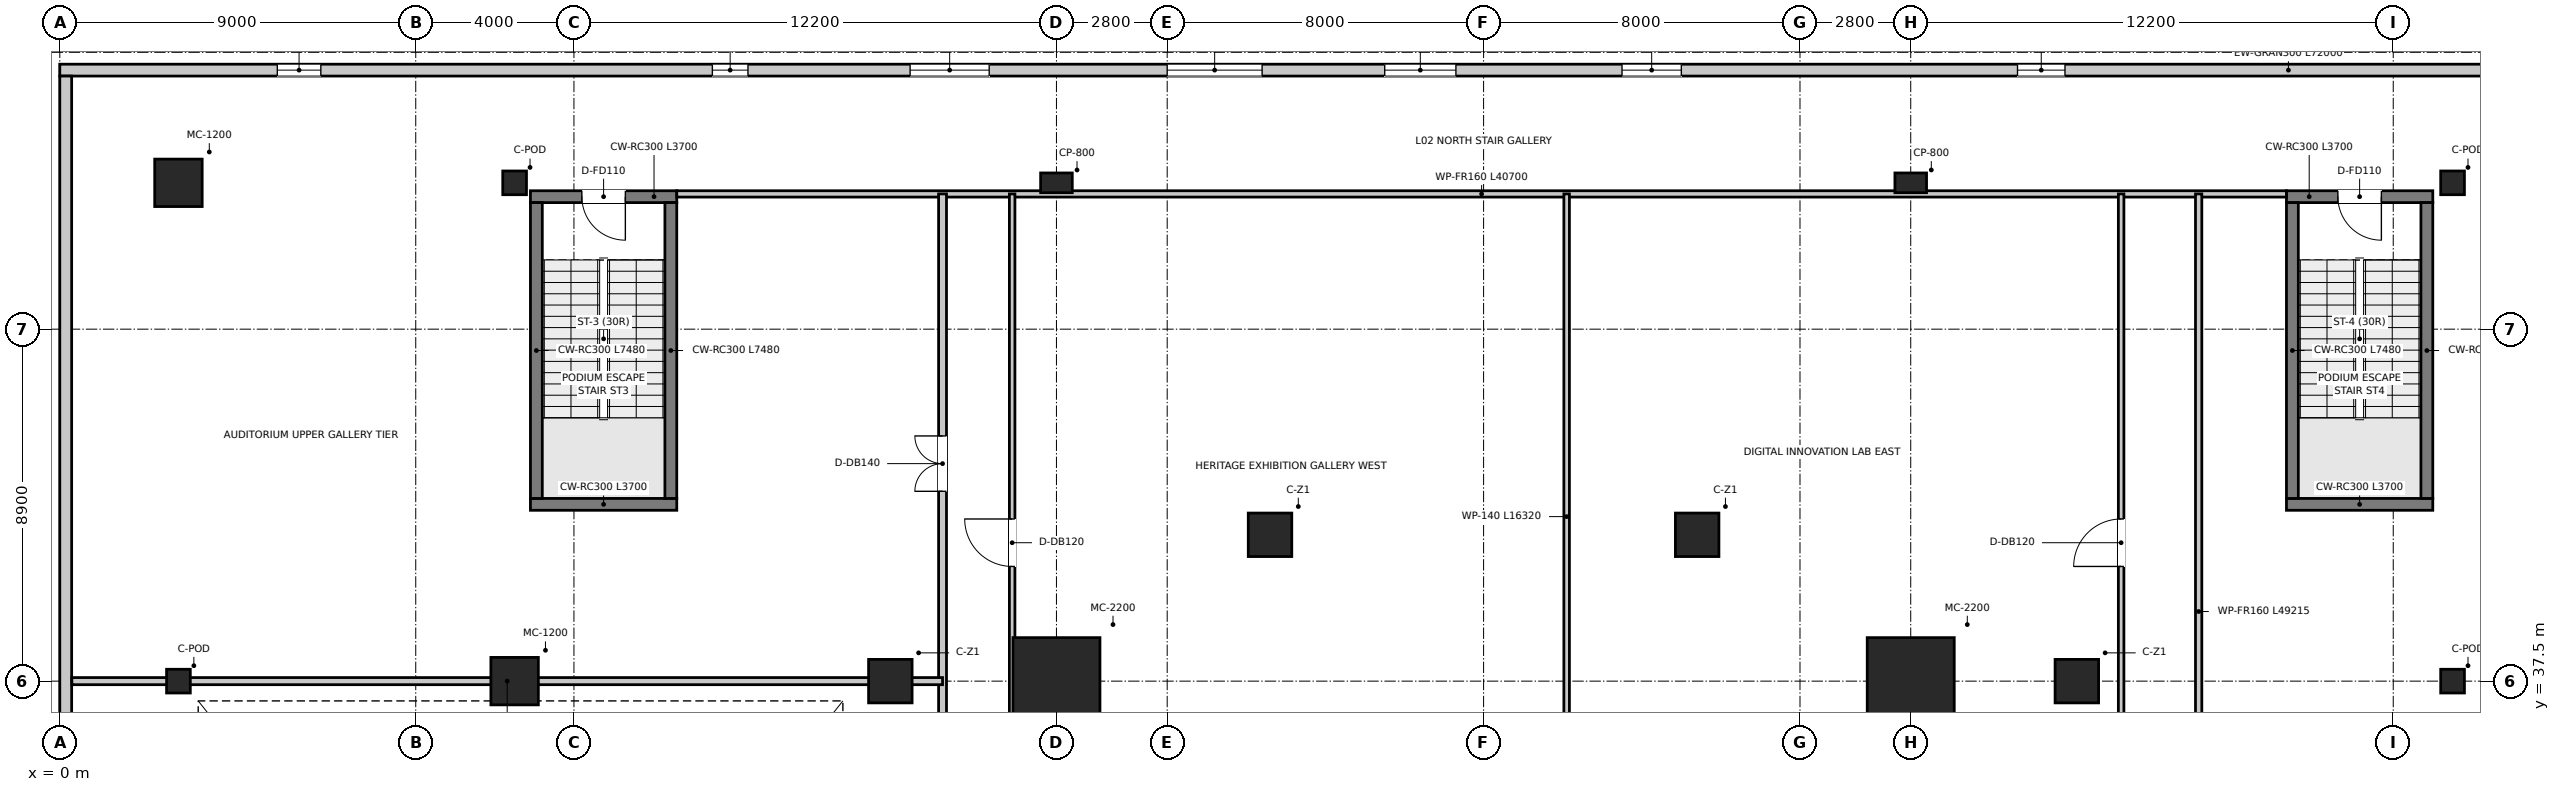
"""IFC4 building model, lengths in metres.
Left out: names, types, materials, properties, quantities, classifications, styles, units other than length and angle.
Written with IfcOpenShell. Run it as: python <this file> out.ifc"""

import sys

from ifc_helpers import new_model, si_unit, direction, frame, frame_2d, origin, origin_2d, place, context, subcontext, project, spatial, rectangle, extrude, source, transform, mapped, element, fill, save


model = new_model("IFC4")
c1 = context("Model", 3, precision=1e-05, world=origin(), true_north=direction((0.0, 1.0)))
c2 = subcontext(c1, "Body", "Model", "MODEL_VIEW")
j1 = project(units=[si_unit("LENGTHUNIT", "METRE"), si_unit("PLANEANGLEUNIT", "RADIAN")], contexts=[c1])
p1 = place(None, origin())
s1 = spatial("IfcSite", under=j1, at=p1, CompositionType="ELEMENT")
p2 = place(p1, origin())
s2 = spatial("IfcBuilding", under=s1, at=p2, CompositionType="ELEMENT")
p3 = place(p2, frame((0.0, 0.0, 10.4)))
s3 = spatial("IfcBuildingStorey", under=s2, at=p3, CompositionType="ELEMENT", Elevation=10.4)
p4 = place(p3, frame((11.9, 41.97, 0.0), z_axis=(0.0, 0.0, 1.0), x_axis=(1.0, 0.0, 0.0)))
e1 = element("IfcWall", 1, at=p4, inside=s3, PredefinedType="SHEAR", context=c2, shape_type="SweptSolid", body=[
    extrude(rectangle(XDim=3.7, YDim=0.3, at=frame_2d((1.85, 0.0))), origin(), (0.0, 0.0, 1.0), 5.0),
])
p5 = place(p3, frame((15.6, 49.75, 0.0), z_axis=(0.0, 0.0, 1.0), x_axis=(-1.0, 0.0, 0.0)))
e2 = element("IfcWall", 2, at=p5, inside=s3, PredefinedType="SHEAR", context=c2, shape_type="SweptSolid", body=[
    extrude(rectangle(XDim=3.7, YDim=0.3, at=frame_2d((1.85, 0.0))), origin(), (0.0, 0.0, 1.0), 5.0),
])
p6 = place(p5, frame((1.3, 0.0, 0.0)))
e3 = element("IfcOpeningElement", 3, at=p6, cuts=e2, PredefinedType="OPENING", context=c2, shape_type="SweptSolid", body=[
    extrude(rectangle(XDim=1.1, YDim=2.15, at=frame_2d((0.55, 1.075))), frame((0.0, 0.16, 0.0), z_axis=(0.0, -1.0, 0.0), x_axis=(1.0, 0.0, 0.0)), (0.0, 0.0, 1.0), 0.32),
])
for number, where, z_axis, x_axis in (
    (4, (12.05, 42.12, 0.0), (0.0, 0.0, 1.0), (0.0, 1.0, 0.0)),
    (5, (15.45, 42.12, 0.0), (0.0, 0.0, 1.0), (0.0, 1.0, 0.0)),
):
    element("IfcWall", number, at=place(p3, frame(where, z_axis=z_axis, x_axis=x_axis)), inside=s3, PredefinedType="SHEAR", context=c2, shape_type="SweptSolid", body=[
        extrude(rectangle(XDim=7.48, YDim=0.3, at=frame_2d((3.74, 0.0))), origin(), (0.0, 0.0, 1.0), 5.0),
    ])
p7 = place(p3, frame((56.3, 41.97, 0.0), z_axis=(0.0, 0.0, 1.0), x_axis=(1.0, 0.0, 0.0)))
e6 = element("IfcWall", 6, at=p7, inside=s3, PredefinedType="SHEAR", context=c2, shape_type="SweptSolid", body=[
    extrude(rectangle(XDim=3.7, YDim=0.3, at=frame_2d((1.85, 0.0))), origin(), (0.0, 0.0, 1.0), 5.0),
])
p8 = place(p3, frame((60.0, 49.75, 0.0), z_axis=(0.0, 0.0, 1.0), x_axis=(-1.0, 0.0, 0.0)))
e7 = element("IfcWall", 7, at=p8, inside=s3, PredefinedType="SHEAR", context=c2, shape_type="SweptSolid", body=[
    extrude(rectangle(XDim=3.7, YDim=0.3, at=frame_2d((1.85, 0.0))), origin(), (0.0, 0.0, 1.0), 5.0),
])
p9 = place(p8, frame((1.3, 0.0, 0.0)))
e8 = element("IfcOpeningElement", 8, at=p9, cuts=e7, PredefinedType="OPENING", context=c2, shape_type="SweptSolid", body=[
    extrude(rectangle(XDim=1.1, YDim=2.15, at=frame_2d((0.55, 1.075))), frame((0.0, 0.16, 0.0), z_axis=(0.0, -1.0, 0.0), x_axis=(1.0, 0.0, 0.0)), (0.0, 0.0, 1.0), 0.32),
])
for number, where, z_axis, x_axis in (
    (9, (56.45, 42.12, 0.0), (0.0, 0.0, 1.0), (0.0, 1.0, 0.0)),
    (10, (59.85, 42.12, 0.0), (0.0, 0.0, 1.0), (0.0, 1.0, 0.0)),
):
    element("IfcWall", number, at=place(p3, frame(where, z_axis=z_axis, x_axis=x_axis)), inside=s3, PredefinedType="SHEAR", context=c2, shape_type="SweptSolid", body=[
        extrude(rectangle(XDim=7.48, YDim=0.3, at=frame_2d((3.74, 0.0))), origin(), (0.0, 0.0, 1.0), 5.0),
    ])
m1 = source(origin(), c2, "Body", "SweptSolid", [
    extrude(rectangle(XDim=2.2, YDim=2.2, at=origin_2d()), origin(), (0.0, 0.0, 1.0), 5.0),
])
for number, where, z_axis, x_axis in (
    (11, (46.8, 37.5, 0.0), (0.0, 0.0, 1.0), (1.0, 0.0, 0.0)),
    (12, (25.2, 37.5, 0.0), (0.0, 0.0, 1.0), (1.0, 0.0, 0.0)),
):
    element("IfcColumn", number, at=place(p3, frame(where, z_axis=z_axis, x_axis=x_axis)), inside=s3, PredefinedType="USERDEFINED", context=c2, shape_type="MappedRepresentation", body=[
        mapped(m1, transform((0.0, 0.0, 0.0), x_axis=(1.0, 0.0, 0.0), y_axis=(0.0, 1.0, 0.0), z_axis=(0.0, 0.0, 1.0), scale=1.0)),
    ])
m2 = source(origin(), c2, "Body", "SweptSolid", [
    extrude(rectangle(XDim=1.1, YDim=1.1, at=origin_2d()), origin(), (0.0, 0.0, 1.0), 5.0),
])
for number, where, z_axis, x_axis in (
    (13, (21.0, 37.5, 0.0), (0.0, 0.0, 1.0), (1.0, 0.0, 0.0)),
    (14, (30.6, 41.2, 0.0), (0.0, 0.0, 1.0), (1.0, 0.0, 0.0)),
    (15, (41.4, 41.2, 0.0), (0.0, 0.0, 1.0), (1.0, 0.0, 0.0)),
    (16, (51.0, 37.5, 0.0), (0.0, 0.0, 1.0), (1.0, 0.0, 0.0)),
):
    element("IfcColumn", number, at=place(p3, frame(where, z_axis=z_axis, x_axis=x_axis)), inside=s3, PredefinedType="COLUMN", context=c2, shape_type="MappedRepresentation", body=[
        mapped(m2, transform((0.0, 0.0, 0.0), x_axis=(1.0, 0.0, 0.0), y_axis=(0.0, 1.0, 0.0), z_axis=(0.0, 0.0, 1.0), scale=1.0)),
    ])
m3 = source(origin(), c2, "Body", "SweptSolid", [
    extrude(rectangle(XDim=0.6, YDim=0.6, at=origin_2d()), origin(), (0.0, 0.0, 1.0), 5.0),
])
p10 = place(p3, frame((3.0, 37.5, 0.0), z_axis=(0.0, 0.0, 1.0), x_axis=(1.0, 0.0, 0.0)))
e17 = element("IfcColumn", 17, at=p10, inside=s3, PredefinedType="COLUMN", context=c2, shape_type="MappedRepresentation", body=[
    mapped(m3, transform((0.0, 0.0, 0.0), x_axis=(1.0, 0.0, 0.0), y_axis=(0.0, 1.0, 0.0), z_axis=(0.0, 0.0, 1.0), scale=1.0)),
])
m4 = source(origin(), c2, "Body", "SweptSolid", [
    extrude(rectangle(XDim=1.2, YDim=1.2, at=origin_2d()), origin(), (0.0, 0.0, 1.0), 5.0),
])
for number, where, z_axis, x_axis in (
    (18, (3.0, 50.1, 0.0), (0.0, 0.0, 1.0), (1.0, 0.0, 0.0)),
    (19, (11.5, 37.5, 0.0), (0.0, 0.0, 1.0), (1.0, 0.0, 0.0)),
):
    element("IfcColumn", number, at=place(p3, frame(where, z_axis=z_axis, x_axis=x_axis)), inside=s3, PredefinedType="USERDEFINED", context=c2, shape_type="MappedRepresentation", body=[
        mapped(m4, transform((0.0, 0.0, 0.0), x_axis=(1.0, 0.0, 0.0), y_axis=(0.0, 1.0, 0.0), z_axis=(0.0, 0.0, 1.0), scale=1.0)),
    ])
for number, where, z_axis, x_axis in (
    (20, (11.5, 50.1, 0.0), (0.0, 0.0, 1.0), (1.0, 0.0, 0.0)),
    (21, (60.5, 37.5, 0.0), (0.0, 0.0, 1.0), (1.0, 0.0, 0.0)),
    (22, (60.5, 50.1, 0.0), (0.0, 0.0, 1.0), (1.0, 0.0, 0.0)),
):
    element("IfcColumn", number, at=place(p3, frame(where, z_axis=z_axis, x_axis=x_axis)), inside=s3, PredefinedType="COLUMN", context=c2, shape_type="MappedRepresentation", body=[
        mapped(m3, transform((0.0, 0.0, 0.0), x_axis=(1.0, 0.0, 0.0), y_axis=(0.0, 1.0, 0.0), z_axis=(0.0, 0.0, 1.0), scale=1.0)),
    ])
m5 = source(origin(), c2, "Body", "SweptSolid", [
    extrude(rectangle(XDim=0.8, YDim=0.5, at=origin_2d()), origin(), (0.0, 0.0, 1.0), 5.0),
])
for number, where, z_axis, x_axis in (
    (23, (25.2, 50.1, 0.0), (0.0, 0.0, 1.0), (1.0, 0.0, 0.0)),
    (24, (46.8, 50.1, 0.0), (0.0, 0.0, 1.0), (1.0, 0.0, 0.0)),
):
    element("IfcColumn", number, at=place(p3, frame(where, z_axis=z_axis, x_axis=x_axis)), inside=s3, PredefinedType="PILASTER", context=c2, shape_type="MappedRepresentation", body=[
        mapped(m5, transform((0.0, 0.0, 0.0), x_axis=(1.0, 0.0, 0.0), y_axis=(0.0, 1.0, 0.0), z_axis=(0.0, 0.0, 1.0), scale=1.0)),
    ])
p11 = place(p3, frame((0.0, 52.95, 0.0), z_axis=(0.0, 0.0, 1.0), x_axis=(1.0, 0.0, 0.0)))
e25 = element("IfcWall", 25, at=p11, inside=s3, PredefinedType="SOLIDWALL", context=c2, shape_type="SweptSolid", body=[
    extrude(rectangle(XDim=72.0, YDim=0.3, at=frame_2d((36.0, 0.0))), origin(), (0.0, 0.0, 1.0), 4.7),
])
p12 = place(p11, frame((5.5, 0.0, 1.25)))
e26 = element("IfcOpeningElement", 26, at=p12, cuts=e25, PredefinedType="OPENING", context=c2, shape_type="SweptSolid", body=[
    extrude(rectangle(XDim=1.1, YDim=1.5, at=frame_2d((0.55, 0.75))), frame((0.0, 0.16, 0.0), z_axis=(0.0, -1.0, 0.0), x_axis=(1.0, 0.0, 0.0)), (0.0, 0.0, 1.0), 0.32),
])
p13 = place(p11, frame((16.5, 0.0, 1.25)))
e27 = element("IfcOpeningElement", 27, at=p13, cuts=e25, PredefinedType="OPENING", context=c2, shape_type="SweptSolid", body=[
    extrude(rectangle(XDim=0.9, YDim=1.5, at=frame_2d((0.45, 0.75))), frame((0.0, 0.16, 0.0), z_axis=(0.0, -1.0, 0.0), x_axis=(1.0, 0.0, 0.0)), (0.0, 0.0, 1.0), 0.32),
])
p14 = place(p11, frame((21.5, 0.0, 1.1)))
e28 = element("IfcOpeningElement", 28, at=p14, cuts=e25, PredefinedType="OPENING", context=c2, shape_type="SweptSolid", body=[
    extrude(rectangle(XDim=2.0, YDim=1.8, at=frame_2d((1.0, 0.9))), frame((0.0, 0.16, 0.0), z_axis=(0.0, -1.0, 0.0), x_axis=(1.0, 0.0, 0.0)), (0.0, 0.0, 1.0), 0.32),
])
p15 = place(p11, frame((28.0, 0.0, 0.9)))
e29 = element("IfcOpeningElement", 29, at=p15, cuts=e25, PredefinedType="OPENING", context=c2, shape_type="SweptSolid", body=[
    extrude(rectangle(XDim=2.4, YDim=2.6, at=frame_2d((1.2, 1.3))), frame((0.0, 0.16, 0.0), z_axis=(0.0, -1.0, 0.0), x_axis=(1.0, 0.0, 0.0)), (0.0, 0.0, 1.0), 0.32),
])
p16 = place(p11, frame((33.5, 0.0, 0.9)))
e30 = element("IfcOpeningElement", 30, at=p16, cuts=e25, PredefinedType="OPENING", context=c2, shape_type="SweptSolid", body=[
    extrude(rectangle(XDim=1.8, YDim=2.6, at=frame_2d((0.9, 1.3))), frame((0.0, 0.16, 0.0), z_axis=(0.0, -1.0, 0.0), x_axis=(1.0, 0.0, 0.0)), (0.0, 0.0, 1.0), 0.32),
])
p17 = place(p11, frame((39.5, 0.0, 0.95)))
e31 = element("IfcOpeningElement", 31, at=p17, cuts=e25, PredefinedType="OPENING", context=c2, shape_type="SweptSolid", body=[
    extrude(rectangle(XDim=1.5, YDim=2.4, at=frame_2d((0.75, 1.2))), frame((0.0, 0.16, 0.0), z_axis=(0.0, -1.0, 0.0), x_axis=(1.0, 0.0, 0.0)), (0.0, 0.0, 1.0), 0.32),
])
p18 = place(p11, frame((49.5, 0.0, 0.95)))
e32 = element("IfcOpeningElement", 32, at=p18, cuts=e25, PredefinedType="OPENING", context=c2, shape_type="SweptSolid", body=[
    extrude(rectangle(XDim=1.2, YDim=2.4, at=frame_2d((0.6, 1.2))), frame((0.0, 0.16, 0.0), z_axis=(0.0, -1.0, 0.0), x_axis=(1.0, 0.0, 0.0)), (0.0, 0.0, 1.0), 0.32),
])
p19 = place(p11, frame((62.0, 0.0, 0.9)))
e33 = element("IfcOpeningElement", 33, at=p19, cuts=e25, PredefinedType="OPENING", context=c2, shape_type="SweptSolid", body=[
    extrude(rectangle(XDim=3.0, YDim=2.6, at=frame_2d((1.5, 1.3))), frame((0.0, 0.16, 0.0), z_axis=(0.0, -1.0, 0.0), x_axis=(1.0, 0.0, 0.0)), (0.0, 0.0, 1.0), 0.32),
])
p20 = place(p3, frame((0.15, 0.6, 0.0), z_axis=(0.0, 0.0, 1.0), x_axis=(0.0, 1.0, 0.0)))
e34 = element("IfcWall", 34, at=p20, inside=s3, PredefinedType="SOLIDWALL", context=c2, shape_type="SweptSolid", body=[
    extrude(rectangle(XDim=52.2, YDim=0.3, at=frame_2d((26.1, 0.0))), origin(), (0.0, 0.0, 1.0), 4.7),
])
p21 = place(p3, frame((15.6, 49.82, 0.0), z_axis=(0.0, 0.0, 1.0), x_axis=(1.0, 0.0, 0.0)))
e35 = element("IfcWall", 35, at=p21, inside=s3, PredefinedType="PARTITIONING", context=c2, shape_type="SweptSolid", body=[
    extrude(rectangle(XDim=40.7, YDim=0.16, at=frame_2d((20.35, 0.0))), origin(), (0.0, 0.0, 1.0), 4.01),
])
p22 = place(p3, frame((22.32, 0.605, 0.0), z_axis=(0.0, 0.0, 1.0), x_axis=(0.0, 1.0, 0.0)))
e36 = element("IfcWall", 36, at=p22, inside=s3, PredefinedType="PARTITIONING", context=c2, shape_type="SweptSolid", body=[
    extrude(rectangle(XDim=49.215, YDim=0.2, at=frame_2d((24.607, 0.0))), origin(), (0.0, 0.0, 1.0), 4.0),
])
p23 = place(p22, frame((41.695, 0.0, 0.0)))
e37 = element("IfcOpeningElement", 37, at=p23, cuts=e36, PredefinedType="OPENING", context=c2, shape_type="SweptSolid", body=[
    extrude(rectangle(XDim=1.4, YDim=2.2, at=frame_2d((0.7, 1.1))), frame((0.0, 0.11, 0.0), z_axis=(0.0, -1.0, 0.0), x_axis=(1.0, 0.0, 0.0)), (0.0, 0.0, 1.0), 0.22),
])
p24 = place(p22, frame((8.845, 0.0, 0.0)))
e38 = element("IfcOpeningElement", 38, at=p24, cuts=e36, PredefinedType="OPENING", context=c2, shape_type="SweptSolid", body=[
    extrude(rectangle(XDim=1.1, YDim=2.15, at=frame_2d((0.55, 1.075))), frame((0.0, 0.11, 0.0), z_axis=(0.0, -1.0, 0.0), x_axis=(1.0, 0.0, 0.0)), (0.0, 0.0, 1.0), 0.22),
])
p25 = place(p3, frame((24.08, 29.1, 0.0), z_axis=(0.0, 0.0, 1.0), x_axis=(0.0, 1.0, 0.0)))
e39 = element("IfcWall", 39, at=p25, inside=s3, PredefinedType="PARTITIONING", context=c2, shape_type="SweptSolid", body=[
    extrude(rectangle(XDim=20.72, YDim=0.14, at=frame_2d((10.36, 0.0))), origin(), (0.0, 0.0, 1.0), 4.0),
])
p26 = place(p25, frame((11.3, 0.0, 0.0)))
e40 = element("IfcOpeningElement", 40, at=p26, cuts=e39, PredefinedType="OPENING", context=c2, shape_type="SweptSolid", body=[
    extrude(rectangle(XDim=1.2, YDim=2.15, at=frame_2d((0.6, 1.075))), frame((0.0, 0.08, 0.0), z_axis=(0.0, -1.0, 0.0), x_axis=(1.0, 0.0, 0.0)), (0.0, 0.0, 1.0), 0.16),
])
p27 = place(p3, frame((52.12, 29.1, 0.0), z_axis=(0.0, 0.0, 1.0), x_axis=(0.0, 1.0, 0.0)))
e41 = element("IfcWall", 41, at=p27, inside=s3, PredefinedType="PARTITIONING", context=c2, shape_type="SweptSolid", body=[
    extrude(rectangle(XDim=20.72, YDim=0.14, at=frame_2d((10.36, 0.0))), origin(), (0.0, 0.0, 1.0), 4.06),
])
p28 = place(p27, frame((11.3, 0.0, 0.0)))
e42 = element("IfcOpeningElement", 42, at=p28, cuts=e41, PredefinedType="OPENING", context=c2, shape_type="SweptSolid", body=[
    extrude(rectangle(XDim=1.2, YDim=2.15, at=frame_2d((0.6, 1.075))), frame((0.0, 0.08, 0.0), z_axis=(0.0, -1.0, 0.0), x_axis=(1.0, 0.0, 0.0)), (0.0, 0.0, 1.0), 0.16),
])
p29 = place(p3, frame((54.08, 0.605, 0.0), z_axis=(0.0, 0.0, 1.0), x_axis=(0.0, 1.0, 0.0)))
e43 = element("IfcWall", 43, at=p29, inside=s3, PredefinedType="PARTITIONING", context=c2, shape_type="SweptSolid", body=[
    extrude(rectangle(XDim=49.215, YDim=0.16, at=frame_2d((24.607, 0.0))), origin(), (0.0, 0.0, 1.0), 4.06),
])
p30 = place(p29, frame((14.845, 0.0, 0.0)))
e44 = element("IfcOpeningElement", 44, at=p30, cuts=e43, PredefinedType="OPENING", context=c2, shape_type="SweptSolid", body=[
    extrude(rectangle(XDim=1.1, YDim=2.15, at=frame_2d((0.55, 1.075))), frame((0.0, 0.09, 0.0), z_axis=(0.0, -1.0, 0.0), x_axis=(1.0, 0.0, 0.0)), (0.0, 0.0, 1.0), 0.18),
])
p31 = place(p29, frame((26.845, 0.0, 0.0)))
e45 = element("IfcOpeningElement", 45, at=p31, cuts=e43, PredefinedType="OPENING", context=c2, shape_type="SweptSolid", body=[
    extrude(rectangle(XDim=1.1, YDim=2.15, at=frame_2d((0.55, 1.075))), frame((0.0, 0.09, 0.0), z_axis=(0.0, -1.0, 0.0), x_axis=(1.0, 0.0, 0.0)), (0.0, 0.0, 1.0), 0.18),
])
p32 = place(p3, frame((38.1, 33.5, 0.0), z_axis=(0.0, 0.0, 1.0), x_axis=(0.0, 1.0, 0.0)))
e46 = element("IfcWall", 46, at=p32, inside=s3, PredefinedType="PARTITIONING", context=c2, shape_type="SweptSolid", body=[
    extrude(rectangle(XDim=16.32, YDim=0.14, at=frame_2d((8.16, 0.0))), origin(), (0.0, 0.0, 1.0), 3.9),
])
p33 = place(p3, frame((0.305, 37.5, 0.0), z_axis=(0.0, 0.0, 1.0), x_axis=(1.0, 0.0, 0.0)))
e47 = element("IfcWall", 47, at=p33, inside=s3, PredefinedType="PARTITIONING", context=c2, shape_type="SweptSolid", body=[
    extrude(rectangle(XDim=22.015, YDim=0.18, at=frame_2d((11.008, 0.0))), origin(), (0.0, 0.0, 1.0), 2.9),
])
p34 = place(p12, origin())
e48 = element("IfcWindow", 48, at=p34, inside=s3, PartitioningType="SINGLE_PANEL", PredefinedType="WINDOW", context=c2, shape_type="SweptSolid", body=[
    extrude(rectangle(XDim=1.1, YDim=1.5, at=frame_2d((0.55, 0.75))), frame((0.0, 0.03, 0.0), z_axis=(0.0, -1.0, 0.0), x_axis=(1.0, 0.0, 0.0)), (0.0, 0.0, 1.0), 0.06),
])
fill(e26, e48)
p35 = place(p13, origin())
e49 = element("IfcWindow", 49, at=p35, inside=s3, PartitioningType="SINGLE_PANEL", PredefinedType="WINDOW", context=c2, shape_type="SweptSolid", body=[
    extrude(rectangle(XDim=0.9, YDim=1.5, at=frame_2d((0.45, 0.75))), frame((0.0, 0.03, 0.0), z_axis=(0.0, -1.0, 0.0), x_axis=(1.0, 0.0, 0.0)), (0.0, 0.0, 1.0), 0.06),
])
fill(e27, e49)
p36 = place(p14, origin())
e50 = element("IfcWindow", 50, at=p36, inside=s3, PartitioningType="SINGLE_PANEL", PredefinedType="WINDOW", context=c2, shape_type="SweptSolid", body=[
    extrude(rectangle(XDim=2.0, YDim=1.8, at=frame_2d((1.0, 0.9))), frame((0.0, 0.03, 0.0), z_axis=(0.0, -1.0, 0.0), x_axis=(1.0, 0.0, 0.0)), (0.0, 0.0, 1.0), 0.06),
])
fill(e28, e50)
p37 = place(p15, origin())
e51 = element("IfcWindow", 51, at=p37, inside=s3, PartitioningType="SINGLE_PANEL", PredefinedType="WINDOW", context=c2, shape_type="SweptSolid", body=[
    extrude(rectangle(XDim=2.4, YDim=2.6, at=frame_2d((1.2, 1.3))), frame((0.0, 0.03, 0.0), z_axis=(0.0, -1.0, 0.0), x_axis=(1.0, 0.0, 0.0)), (0.0, 0.0, 1.0), 0.06),
])
fill(e29, e51)
p38 = place(p16, origin())
e52 = element("IfcWindow", 52, at=p38, inside=s3, PartitioningType="SINGLE_PANEL", PredefinedType="WINDOW", context=c2, shape_type="SweptSolid", body=[
    extrude(rectangle(XDim=1.8, YDim=2.6, at=frame_2d((0.9, 1.3))), frame((0.0, 0.03, 0.0), z_axis=(0.0, -1.0, 0.0), x_axis=(1.0, 0.0, 0.0)), (0.0, 0.0, 1.0), 0.06),
])
fill(e30, e52)
p39 = place(p17, origin())
e53 = element("IfcWindow", 53, at=p39, inside=s3, PartitioningType="SINGLE_PANEL", PredefinedType="WINDOW", context=c2, shape_type="SweptSolid", body=[
    extrude(rectangle(XDim=1.5, YDim=2.4, at=frame_2d((0.75, 1.2))), frame((0.0, 0.03, 0.0), z_axis=(0.0, -1.0, 0.0), x_axis=(1.0, 0.0, 0.0)), (0.0, 0.0, 1.0), 0.06),
])
fill(e31, e53)
p40 = place(p18, origin())
e54 = element("IfcWindow", 54, at=p40, inside=s3, PartitioningType="SINGLE_PANEL", PredefinedType="WINDOW", context=c2, shape_type="SweptSolid", body=[
    extrude(rectangle(XDim=1.2, YDim=2.4, at=frame_2d((0.6, 1.2))), frame((0.0, 0.03, 0.0), z_axis=(0.0, -1.0, 0.0), x_axis=(1.0, 0.0, 0.0)), (0.0, 0.0, 1.0), 0.06),
])
fill(e32, e54)
p41 = place(p6, origin())
e55 = element("IfcDoor", 55, at=p41, inside=s3, OperationType="SINGLE_SWING_LEFT", PredefinedType="DOOR", context=c2, shape_type="SweptSolid", body=[
    extrude(rectangle(XDim=1.1, YDim=2.15, at=frame_2d((0.55, 1.075))), frame((0.0, 0.025, 0.0), z_axis=(0.0, -1.0, 0.0), x_axis=(1.0, 0.0, 0.0)), (0.0, 0.0, 1.0), 0.05),
])
fill(e3, e55)
p42 = place(p9, origin())
e56 = element("IfcDoor", 56, at=p42, inside=s3, OperationType="SINGLE_SWING_LEFT", PredefinedType="DOOR", context=c2, shape_type="SweptSolid", body=[
    extrude(rectangle(XDim=1.1, YDim=2.15, at=frame_2d((0.55, 1.075))), frame((0.0, 0.025, 0.0), z_axis=(0.0, -1.0, 0.0), x_axis=(1.0, 0.0, 0.0)), (0.0, 0.0, 1.0), 0.05),
])
fill(e8, e56)
p43 = place(p23, origin())
e57 = element("IfcDoor", 57, at=p43, inside=s3, OperationType="DOUBLE_DOOR_SINGLE_SWING", PredefinedType="DOOR", context=c2, shape_type="SweptSolid", body=[
    extrude(rectangle(XDim=1.4, YDim=2.2, at=frame_2d((0.7, 1.1))), frame((0.0, 0.025, 0.0), z_axis=(0.0, -1.0, 0.0), x_axis=(1.0, 0.0, 0.0)), (0.0, 0.0, 1.0), 0.05),
])
fill(e37, e57)
p44 = place(p26, origin())
e58 = element("IfcDoor", 58, at=p44, inside=s3, OperationType="SINGLE_SWING_RIGHT", PredefinedType="DOOR", context=c2, shape_type="SweptSolid", body=[
    extrude(rectangle(XDim=1.2, YDim=2.15, at=frame_2d((0.6, 1.075))), frame((0.0, 0.025, 0.0), z_axis=(0.0, -1.0, 0.0), x_axis=(1.0, 0.0, 0.0)), (0.0, 0.0, 1.0), 0.05),
])
fill(e40, e58)
p45 = place(p28, origin())
e59 = element("IfcDoor", 59, at=p45, inside=s3, OperationType="SINGLE_SWING_LEFT", PredefinedType="DOOR", context=c2, shape_type="SweptSolid", body=[
    extrude(rectangle(XDim=1.2, YDim=2.15, at=frame_2d((0.6, 1.075))), frame((0.0, 0.025, 0.0), z_axis=(0.0, -1.0, 0.0), x_axis=(1.0, 0.0, 0.0)), (0.0, 0.0, 1.0), 0.05),
])
fill(e42, e59)
save(model, sys.argv[1])
